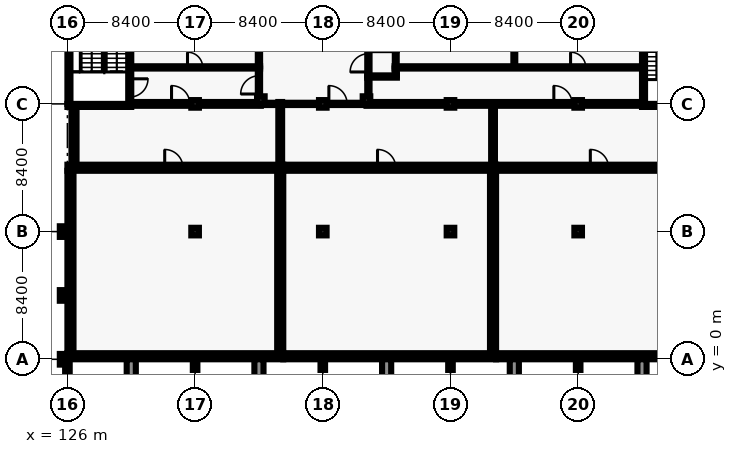
"""IFC4 building model, lengths in metres.
Left out: names, types, materials, properties, quantities, classifications, styles, units other than length and angle.
Written with IfcOpenShell. Run it as: python <this file> out.ifc"""

import sys

from ifc_helpers import new_model, si_unit, direction, frame, frame_2d, origin, origin_2d, place, context, subcontext, project, spatial, rectangle, extrude, element, fill, save


model = new_model("IFC4")
c1 = context("Model", 3, precision=1e-05, world=origin(), true_north=direction((0.0, 1.0)))
c2 = subcontext(c1, "Body", "Model", "MODEL_VIEW")
j1 = project(units=[si_unit("LENGTHUNIT", "METRE"), si_unit("PLANEANGLEUNIT", "RADIAN")], contexts=[c1])
p1 = place(None, origin())
s1 = spatial("IfcSite", under=j1, at=p1, CompositionType="ELEMENT")
p2 = place(p1, origin())
s2 = spatial("IfcBuilding", under=s1, at=p2, CompositionType="ELEMENT")
p3 = place(p2, frame((0.0, 0.0, 10.2)))
s3 = spatial("IfcBuildingStorey", under=s2, at=p3, CompositionType="ELEMENT", Elevation=10.2)
p4 = place(p3, frame((130.2, 16.7, 0.0), z_axis=(0.0, 0.0, 1.0), x_axis=(-1.0, 0.0, 0.0)))
e1 = element("IfcWall", 1, at=p4, inside=s3, PredefinedType="SHEAR", context=c2, shape_type="SweptSolid", body=[
    extrude(rectangle(XDim=4.2, YDim=0.2, at=frame_2d((2.1, 0.0))), origin(), (0.0, 0.0, 1.0), 4.8),
])
p5 = place(p3, frame((126.1, 16.8, 0.0), z_axis=(0.0, 0.0, 1.0), x_axis=(0.0, 1.0, 0.0)))
e2 = element("IfcWall", 2, at=p5, inside=s3, PredefinedType="SHEAR", context=c2, shape_type="SweptSolid", body=[
    extrude(rectangle(XDim=8.2, YDim=0.2, at=frame_2d((4.1, 0.0))), origin(), (0.0, 0.0, 1.0), 4.8),
])
p6 = place(p3, frame((130.1, 25.0, 0.0), z_axis=(0.0, 0.0, 1.0), x_axis=(0.0, -1.0, 0.0)))
e3 = element("IfcWall", 3, at=p6, inside=s3, PredefinedType="SHEAR", context=c2, shape_type="SweptSolid", body=[
    extrude(rectangle(XDim=8.2, YDim=0.2, at=frame_2d((4.1, 0.0))), origin(), (0.0, 0.0, 1.0), 4.8),
])
p7 = place(p6, frame((6.55, 0.0, 0.0)))
e4 = element("IfcOpeningElement", 4, at=p7, cuts=e3, PredefinedType="OPENING", context=c2, shape_type="SweptSolid", body=[
    extrude(rectangle(XDim=1.2, YDim=2.1, at=frame_2d((0.6, 1.05))), frame((0.0, 0.11, 0.0), z_axis=(0.0, -1.0, 0.0), x_axis=(1.0, 0.0, 0.0)), (0.0, 0.0, 1.0), 0.22),
])
p8 = place(p3, frame((168.0, 16.7, 0.0), z_axis=(0.0, 0.0, 1.0), x_axis=(-1.0, 0.0, 0.0)))
e5 = element("IfcWall", 5, at=p8, inside=s3, PredefinedType="SHEAR", context=c2, shape_type="SweptSolid", body=[
    extrude(rectangle(XDim=4.199, YDim=0.2, at=frame_2d((2.1, 0.0))), origin(), (0.0, 0.0, 1.0), 4.8),
])
p9 = place(p3, frame((163.9, 16.8, 0.0), z_axis=(0.0, 0.0, 1.0), x_axis=(0.0, 1.0, 0.0)))
e6 = element("IfcWall", 6, at=p9, inside=s3, PredefinedType="SHEAR", context=c2, shape_type="SweptSolid", body=[
    extrude(rectangle(XDim=8.2, YDim=0.2, at=frame_2d((4.1, 0.0))), origin(), (0.0, 0.0, 1.0), 4.8),
])
p10 = place(p9, frame((6.55, 0.0, 0.0)))
e7 = element("IfcOpeningElement", 7, at=p10, cuts=e6, PredefinedType="OPENING", context=c2, shape_type="SweptSolid", body=[
    extrude(rectangle(XDim=1.2, YDim=2.1, at=frame_2d((0.6, 1.05))), frame((0.0, 0.11, 0.0), z_axis=(0.0, -1.0, 0.0), x_axis=(1.0, 0.0, 0.0)), (0.0, 0.0, 1.0), 0.22),
])
p11 = place(p3, frame((140.2, 0.2, 0.0), z_axis=(0.0, 0.0, 1.0), x_axis=(-1.0, 0.0, 0.0)))
e8 = element("IfcWall", 8, at=p11, inside=s3, PredefinedType="SHEAR", context=c2, shape_type="SweptSolid", body=[
    extrude(rectangle(XDim=14.2, YDim=0.4, at=frame_2d((7.1, 0.0))), origin(), (0.0, 0.0, 1.0), 4.8),
])
p12 = place(p3, frame((126.0, 12.6, 0.0), z_axis=(0.0, 0.0, 1.0), x_axis=(1.0, 0.0, 0.0)))
e9 = element("IfcWall", 9, at=p12, inside=s3, PredefinedType="SHEAR", context=c2, shape_type="SweptSolid", body=[
    extrude(rectangle(XDim=14.2, YDim=0.4, at=frame_2d((7.1, 0.0))), origin(), (0.0, 0.0, 1.0), 4.8),
])
p13 = place(p12, frame((6.4, 0.0, 0.0)))
e10 = element("IfcOpeningElement", 10, at=p13, cuts=e9, PredefinedType="OPENING", context=c2, shape_type="SweptSolid", body=[
    extrude(rectangle(XDim=1.2, YDim=2.1, at=frame_2d((0.6, 1.05))), frame((0.0, 0.21, 0.0), z_axis=(0.0, -1.0, 0.0), x_axis=(1.0, 0.0, 0.0)), (0.0, 0.0, 1.0), 0.42),
])
for number, where, z_axis, x_axis in (
    (11, (126.2, 0.4, 0.0), (0.0, 0.0, 1.0), (0.0, 1.0, 0.0)),
    (12, (140.0, 12.4, 0.0), (0.0, 0.0, 1.0), (0.0, -1.0, 0.0)),
):
    element("IfcWall", number, at=place(p3, frame(where, z_axis=z_axis, x_axis=x_axis)), inside=s3, PredefinedType="SHEAR", context=c2, shape_type="SweptSolid", body=[
        extrude(rectangle(XDim=12.0, YDim=0.4, at=frame_2d((6.0, 0.0))), origin(), (0.0, 0.0, 1.0), 4.8),
    ])
p14 = place(p3, frame((154.2, 0.2, 0.0), z_axis=(0.0, 0.0, 1.0), x_axis=(-1.0, 0.0, 0.0)))
e13 = element("IfcWall", 13, at=p14, inside=s3, PredefinedType="SHEAR", context=c2, shape_type="SweptSolid", body=[
    extrude(rectangle(XDim=14.0, YDim=0.4, at=frame_2d((7.0, 0.0))), origin(), (0.0, 0.0, 1.0), 4.8),
])
p15 = place(p3, frame((140.2, 12.6, 0.0), z_axis=(0.0, 0.0, 1.0), x_axis=(1.0, 0.0, 0.0)))
e14 = element("IfcWall", 14, at=p15, inside=s3, PredefinedType="SHEAR", context=c2, shape_type="SweptSolid", body=[
    extrude(rectangle(XDim=14.0, YDim=0.4, at=frame_2d((7.0, 0.0))), origin(), (0.0, 0.0, 1.0), 4.8),
])
p16 = place(p15, frame((6.2, 0.0, 0.0)))
e15 = element("IfcOpeningElement", 15, at=p16, cuts=e14, PredefinedType="OPENING", context=c2, shape_type="SweptSolid", body=[
    extrude(rectangle(XDim=1.2, YDim=2.1, at=frame_2d((0.6, 1.05))), frame((0.0, 0.21, 0.0), z_axis=(0.0, -1.0, 0.0), x_axis=(1.0, 0.0, 0.0)), (0.0, 0.0, 1.0), 0.42),
])
p17 = place(p3, frame((154.0, 12.4, 0.0), z_axis=(0.0, 0.0, 1.0), x_axis=(0.0, -1.0, 0.0)))
e16 = element("IfcWall", 16, at=p17, inside=s3, PredefinedType="SHEAR", context=c2, shape_type="SweptSolid", body=[
    extrude(rectangle(XDim=12.0, YDim=0.4, at=frame_2d((6.0, 0.0))), origin(), (0.0, 0.0, 1.0), 4.8),
])
p18 = place(p3, frame((168.0, 0.2, 0.0), z_axis=(0.0, 0.0, 1.0), x_axis=(-1.0, 0.0, 0.0)))
e17 = element("IfcWall", 17, at=p18, inside=s3, PredefinedType="SHEAR", context=c2, shape_type="SweptSolid", body=[
    extrude(rectangle(XDim=13.8, YDim=0.4, at=frame_2d((6.9, 0.0))), origin(), (0.0, 0.0, 1.0), 4.8),
])
p19 = place(p3, frame((154.2, 12.6, 0.0), z_axis=(0.0, 0.0, 1.0), x_axis=(1.0, 0.0, 0.0)))
e18 = element("IfcWall", 18, at=p19, inside=s3, PredefinedType="SHEAR", context=c2, shape_type="SweptSolid", body=[
    extrude(rectangle(XDim=13.8, YDim=0.4, at=frame_2d((6.9, 0.0))), origin(), (0.0, 0.0, 1.0), 4.8),
])
p20 = place(p19, frame((6.2, 0.0, 0.0)))
e19 = element("IfcOpeningElement", 19, at=p20, cuts=e18, PredefinedType="OPENING", context=c2, shape_type="SweptSolid", body=[
    extrude(rectangle(XDim=1.2, YDim=2.1, at=frame_2d((0.6, 1.05))), frame((0.0, 0.21, 0.0), z_axis=(0.0, -1.0, 0.0), x_axis=(1.0, 0.0, 0.0)), (0.0, 0.0, 1.0), 0.42),
])
for number, where, z_axis, x_axis in (
    (20, (134.4, 8.4, 0.0), (0.0, 0.0, 1.0), (1.0, 0.0, 0.0)),
    (21, (134.4, 16.8, 0.0), (0.0, 0.0, 1.0), (1.0, 0.0, 0.0)),
    (22, (142.8, 8.4, 0.0), (0.0, 0.0, 1.0), (1.0, 0.0, 0.0)),
    (23, (142.8, 16.8, 0.0), (0.0, 0.0, 1.0), (1.0, 0.0, 0.0)),
    (24, (151.2, 8.4, 0.0), (0.0, 0.0, 1.0), (1.0, 0.0, 0.0)),
    (25, (151.2, 16.8, 0.0), (0.0, 0.0, 1.0), (1.0, 0.0, 0.0)),
    (26, (159.6, 8.4, 0.0), (0.0, 0.0, 1.0), (1.0, 0.0, 0.0)),
    (27, (159.6, 16.8, 0.0), (0.0, 0.0, 1.0), (1.0, 0.0, 0.0)),
    (28, (138.725, 17.05, 0.0), (0.0, 0.0, 1.0), (1.0, 0.0, 0.0)),
    (29, (145.675, 17.05, 0.0), (0.0, 0.0, 1.0), (1.0, 0.0, 0.0)),
):
    element("IfcColumn", number, at=place(p3, frame(where, z_axis=z_axis, x_axis=x_axis)), inside=s3, PredefinedType="COLUMN", context=c2, shape_type="SweptSolid", body=[
        extrude(rectangle(XDim=0.5, YDim=0.5, at=origin_2d()), origin(), (0.0, 0.0, 1.0), 4.8),
    ])
for number, where, z_axis, x_axis in (
    (30, (126.0, -0.5, 0.0), (0.0, 0.0, 1.0), (1.0, 0.0, 0.0)),
    (31, (134.4, -0.35, 0.0), (0.0, 0.0, 1.0), (1.0, 0.0, 0.0)),
    (32, (142.8, -0.35, 0.0), (0.0, 0.0, 1.0), (1.0, 0.0, 0.0)),
    (33, (151.2, -0.35, 0.0), (0.0, 0.0, 1.0), (1.0, 0.0, 0.0)),
    (34, (159.6, -0.35, 0.0), (0.0, 0.0, 1.0), (1.0, 0.0, 0.0)),
):
    element("IfcColumn", number, at=place(p3, frame(where, z_axis=z_axis, x_axis=x_axis)), inside=s3, PredefinedType="PILASTER", context=c2, shape_type="SweptSolid", body=[
        extrude(rectangle(XDim=0.3, YDim=0.7, at=origin_2d()), origin(), (0.0, 0.0, 1.0), 4.8),
    ])
p21 = place(p3, frame((126.45, 12.8, 0.0), z_axis=(0.0, 0.0, 1.0), x_axis=(0.0, 1.0, 0.0)))
e35 = element("IfcWall", 35, at=p21, inside=s3, PredefinedType="SOLIDWALL", context=c2, shape_type="SweptSolid", body=[
    extrude(rectangle(XDim=3.8, YDim=0.3, at=frame_2d((1.9, 0.0))), origin(), (0.0, 0.0, 1.0), 4.5),
])
for number, where, z_axis, x_axis in (
    (36, (125.65, 0.0, 0.0), (0.0, 0.0, 1.0), (0.0, 1.0, 0.0)),
    (37, (125.65, 4.2, 0.0), (0.0, 0.0, 1.0), (0.0, 1.0, 0.0)),
    (38, (125.65, 8.4, 0.0), (0.0, 0.0, 1.0), (0.0, 1.0, 0.0)),
):
    element("IfcColumn", number, at=place(p3, frame(where, z_axis=z_axis, x_axis=x_axis)), inside=s3, PredefinedType="PILASTER", context=c2, shape_type="SweptSolid", body=[
        extrude(rectangle(XDim=0.3, YDim=0.7, at=origin_2d()), origin(), (0.0, 0.0, 1.0), 4.8),
    ])
for number, where, z_axis, x_axis in (
    (39, (130.2, 0.0, 0.0), (0.0, 0.0, 1.0), (0.0, -1.0, 0.0)),
    (40, (138.6, 0.0, 0.0), (0.0, 0.0, 1.0), (0.0, -1.0, 0.0)),
    (41, (147.0, 0.0, 0.0), (0.0, 0.0, 1.0), (0.0, -1.0, 0.0)),
    (42, (155.4, 0.0, 0.0), (0.0, 0.0, 1.0), (0.0, -1.0, 0.0)),
    (43, (163.8, 0.0, 0.0), (0.0, 0.0, 1.0), (0.0, -1.0, 0.0)),
):
    element("IfcWall", number, at=place(p3, frame(where, z_axis=z_axis, x_axis=x_axis)), inside=s3, PredefinedType="SOLIDWALL", context=c2, shape_type="SweptSolid", body=[
        extrude(rectangle(XDim=1.5, YDim=0.6, at=frame_2d((0.75, 0.0))), origin(), (0.0, 0.0, 1.0), 4.8),
    ])
p22 = place(p3, frame((130.2, 16.8, 0.0), z_axis=(0.0, 0.0, 1.0), x_axis=(1.0, 0.0, 0.0)))
e44 = element("IfcWall", 44, at=p22, inside=s3, PredefinedType="PARTITIONING", context=c2, shape_type="SweptSolid", body=[
    extrude(rectangle(XDim=8.525, YDim=0.25, at=frame_2d((4.263, 0.0))), origin(), (0.0, 0.0, 1.0), 3.8),
])
p23 = place(p22, frame((2.65, 0.0, 0.0)))
e45 = element("IfcOpeningElement", 45, at=p23, cuts=e44, PredefinedType="OPENING", context=c2, shape_type="SweptSolid", body=[
    extrude(rectangle(XDim=1.2, YDim=2.1, at=frame_2d((0.6, 1.05))), frame((0.0, 0.135, 0.0), z_axis=(0.0, -1.0, 0.0), x_axis=(1.0, 0.0, 0.0)), (0.0, 0.0, 1.0), 0.27),
])
p24 = place(p3, frame((145.675, 16.8, 0.0), z_axis=(0.0, 0.0, 1.0), x_axis=(1.0, 0.0, 0.0)))
e46 = element("IfcWall", 46, at=p24, inside=s3, PredefinedType="PARTITIONING", context=c2, shape_type="SweptSolid", body=[
    extrude(rectangle(XDim=18.125, YDim=0.25, at=frame_2d((9.062, 0.0))), origin(), (0.0, 0.0, 1.0), 3.8),
])
p25 = place(p24, frame((12.325, 0.0, 0.0)))
e47 = element("IfcOpeningElement", 47, at=p25, cuts=e46, PredefinedType="OPENING", context=c2, shape_type="SweptSolid", body=[
    extrude(rectangle(XDim=1.2, YDim=2.1, at=frame_2d((0.6, 1.05))), frame((0.0, 0.135, 0.0), z_axis=(0.0, -1.0, 0.0), x_axis=(1.0, 0.0, 0.0)), (0.0, 0.0, 1.0), 0.27),
])
p26 = place(p3, frame((140.0, 12.8, 0.0), z_axis=(0.0, 0.0, 1.0), x_axis=(0.0, 1.0, 0.0)))
e48 = element("IfcWall", 48, at=p26, inside=s3, PredefinedType="PARTITIONING", context=c2, shape_type="SweptSolid", body=[
    extrude(rectangle(XDim=4.125, YDim=0.25, at=frame_2d((2.062, 0.0))), origin(), (0.0, 0.0, 1.0), 3.8),
])
p27 = place(p3, frame((154.0, 12.8, 0.0), z_axis=(0.0, 0.0, 1.0), x_axis=(0.0, 1.0, 0.0)))
e49 = element("IfcWall", 49, at=p27, inside=s3, PredefinedType="PARTITIONING", context=c2, shape_type="SweptSolid", body=[
    extrude(rectangle(XDim=3.875, YDim=0.25, at=frame_2d((1.938, 0.0))), origin(), (0.0, 0.0, 1.0), 3.8),
])
p28 = place(p3, frame((145.725, 18.6, 0.0), z_axis=(0.0, 0.0, 1.0), x_axis=(1.0, 0.0, 0.0)))
e50 = element("IfcWall", 50, at=p28, inside=s3, PredefinedType="PARTITIONING", context=c2, shape_type="SweptSolid", body=[
    extrude(rectangle(XDim=1.95, YDim=0.15, at=frame_2d((0.975, 0.0))), origin(), (0.0, 0.0, 1.0), 4.5),
])
p29 = place(p3, frame((130.2, 19.2, 0.0), z_axis=(0.0, 0.0, 1.0), x_axis=(1.0, 0.0, 0.0)))
e51 = element("IfcWall", 51, at=p29, inside=s3, PredefinedType="PARTITIONING", context=c2, shape_type="SweptSolid", body=[
    extrude(rectangle(XDim=8.475, YDim=0.15, at=frame_2d((4.237, 0.0))), origin(), (0.0, 0.0, 1.0), 3.8),
])
p30 = place(p29, frame((3.7, 0.0, 0.0)))
e52 = element("IfcOpeningElement", 52, at=p30, cuts=e51, PredefinedType="OPENING", context=c2, shape_type="SweptSolid", body=[
    extrude(rectangle(XDim=1.0, YDim=2.1, at=frame_2d((0.5, 1.05))), frame((0.0, 0.085, 0.0), z_axis=(0.0, -1.0, 0.0), x_axis=(1.0, 0.0, 0.0)), (0.0, 0.0, 1.0), 0.17),
])
p31 = place(p3, frame((147.525, 19.2, 0.0), z_axis=(0.0, 0.0, 1.0), x_axis=(1.0, 0.0, 0.0)))
e53 = element("IfcWall", 53, at=p31, inside=s3, PredefinedType="PARTITIONING", context=c2, shape_type="SweptSolid", body=[
    extrude(rectangle(XDim=16.275, YDim=0.15, at=frame_2d((8.137, 0.0))), origin(), (0.0, 0.0, 1.0), 3.8),
])
p32 = place(p31, frame((11.575, 0.0, 0.0)))
e54 = element("IfcOpeningElement", 54, at=p32, cuts=e53, PredefinedType="OPENING", context=c2, shape_type="SweptSolid", body=[
    extrude(rectangle(XDim=1.0, YDim=2.1, at=frame_2d((0.5, 1.05))), frame((0.0, 0.085, 0.0), z_axis=(0.0, -1.0, 0.0), x_axis=(1.0, 0.0, 0.0)), (0.0, 0.0, 1.0), 0.17),
])
p33 = place(p3, frame((138.725, 16.8, 0.0), z_axis=(0.0, 0.0, 1.0), x_axis=(1.0, 0.0, 0.0)))
e55 = element("IfcWall", 55, at=p33, inside=s3, PredefinedType="SOLIDWALL", context=c2, shape_type="SweptSolid", body=[
    extrude(rectangle(XDim=1.15, YDim=0.15, at=frame_2d((0.575, 0.0))), origin(), (0.0, 0.0, 1.0), 3.8),
])
p34 = place(p3, frame((140.125, 16.8, 0.0), z_axis=(0.0, 0.0, 1.0), x_axis=(1.0, 0.0, 0.0)))
e56 = element("IfcWall", 56, at=p34, inside=s3, PredefinedType="SOLIDWALL", context=c2, shape_type="SweptSolid", body=[
    extrude(rectangle(XDim=5.55, YDim=0.15, at=frame_2d((2.775, 0.0))), origin(), (0.0, 0.0, 1.0), 3.8),
])
p35 = place(p34, frame((3.075, 0.0, 0.0)))
e57 = element("IfcOpeningElement", 57, at=p35, cuts=e56, PredefinedType="OPENING", context=c2, shape_type="SweptSolid", body=[
    extrude(rectangle(XDim=1.2, YDim=2.1, at=frame_2d((0.6, 1.05))), frame((0.0, 0.085, 0.0), z_axis=(0.0, -1.0, 0.0), x_axis=(1.0, 0.0, 0.0)), (0.0, 0.0, 1.0), 0.17),
])
p36 = place(p3, frame((147.6, 18.675, 0.0), z_axis=(0.0, 0.0, 1.0), x_axis=(0.0, 1.0, 0.0)))
e58 = element("IfcWall", 58, at=p36, inside=s3, PredefinedType="PARTITIONING", context=c2, shape_type="SweptSolid", body=[
    extrude(rectangle(XDim=0.45, YDim=0.15, at=frame_2d((0.225, 0.0))), origin(), (0.0, 0.0, 1.0), 4.5),
])
p37 = place(p3, frame((138.6, 16.925, 0.0), z_axis=(0.0, 0.0, 1.0), x_axis=(0.0, 1.0, 0.0)))
e59 = element("IfcWall", 59, at=p37, inside=s3, PredefinedType="SOLIDWALL", context=c2, shape_type="SweptSolid", body=[
    extrude(rectangle(XDim=2.2, YDim=0.15, at=frame_2d((1.1, 0.0))), origin(), (0.0, 0.0, 1.0), 3.8),
])
p38 = place(p37, frame((0.525, 0.0, 0.0)))
e60 = element("IfcOpeningElement", 60, at=p38, cuts=e59, PredefinedType="OPENING", context=c2, shape_type="SweptSolid", body=[
    extrude(rectangle(XDim=1.2, YDim=2.1, at=frame_2d((0.6, 1.05))), frame((0.0, 0.085, 0.0), z_axis=(0.0, -1.0, 0.0), x_axis=(1.0, 0.0, 0.0)), (0.0, 0.0, 1.0), 0.17),
])
p39 = place(p3, frame((138.6, 19.275, 0.0), z_axis=(0.0, 0.0, 1.0), x_axis=(0.0, 1.0, 0.0)))
e61 = element("IfcWall", 61, at=p39, inside=s3, PredefinedType="SOLIDWALL", context=c2, shape_type="SweptSolid", body=[
    extrude(rectangle(XDim=3.0, YDim=0.15, at=frame_2d((1.5, 0.0))), origin(), (0.0, 0.0, 1.0), 4.5),
])
p40 = place(p3, frame((145.8, 16.925, 0.0), z_axis=(0.0, 0.0, 1.0), x_axis=(0.0, 1.0, 0.0)))
e62 = element("IfcWall", 62, at=p40, inside=s3, PredefinedType="SOLIDWALL", context=c2, shape_type="SweptSolid", body=[
    extrude(rectangle(XDim=1.6, YDim=0.15, at=frame_2d((0.8, 0.0))), origin(), (0.0, 0.0, 1.0), 3.8),
])
p41 = place(p3, frame((145.8, 18.675, 0.0), z_axis=(0.0, 0.0, 1.0), x_axis=(0.0, 1.0, 0.0)))
e63 = element("IfcWall", 63, at=p41, inside=s3, PredefinedType="SOLIDWALL", context=c2, shape_type="SweptSolid", body=[
    extrude(rectangle(XDim=3.6, YDim=0.15, at=frame_2d((1.8, 0.0))), origin(), (0.0, 0.0, 1.0), 4.5),
])
p42 = place(p41, frame((0.225, 0.0, 0.0)))
e64 = element("IfcOpeningElement", 64, at=p42, cuts=e63, PredefinedType="OPENING", context=c2, shape_type="SweptSolid", body=[
    extrude(rectangle(XDim=1.2, YDim=2.1, at=frame_2d((0.6, 1.05))), frame((0.0, 0.085, 0.0), z_axis=(0.0, -1.0, 0.0), x_axis=(1.0, 0.0, 0.0)), (0.0, 0.0, 1.0), 0.17),
])
p43 = place(p3, frame((147.6, 19.275, 0.0), z_axis=(0.0, 0.0, 1.0), x_axis=(0.0, 1.0, 0.0)))
e65 = element("IfcWall", 65, at=p43, inside=s3, PredefinedType="PARTITIONING", context=c2, shape_type="SweptSolid", body=[
    extrude(rectangle(XDim=1.062, YDim=0.125, at=frame_2d((0.531, 0.0))), origin(), (0.0, 0.0, 1.0), 4.5),
])
p44 = place(p3, frame((155.4, 19.275, 0.0), z_axis=(0.0, 0.0, 1.0), x_axis=(0.0, 1.0, 0.0)))
e66 = element("IfcWall", 66, at=p44, inside=s3, PredefinedType="PARTITIONING", context=c2, shape_type="SweptSolid", body=[
    extrude(rectangle(XDim=5.425, YDim=0.125, at=frame_2d((2.712, 0.0))), origin(), (0.0, 0.0, 1.0), 3.8),
])
p45 = place(p44, frame((2.425, 0.0, 0.0)))
e67 = element("IfcOpeningElement", 67, at=p45, cuts=e66, PredefinedType="OPENING", context=c2, shape_type="SweptSolid", body=[
    extrude(rectangle(XDim=1.0, YDim=2.1, at=frame_2d((0.5, 1.05))), frame((0.0, 0.073, 0.0), z_axis=(0.0, -1.0, 0.0), x_axis=(1.0, 0.0, 0.0)), (0.0, 0.0, 1.0), 0.145),
])
p46 = place(p7, origin())
e68 = element("IfcDoor", 68, at=p46, inside=s3, OperationType="SINGLE_SWING_LEFT", PredefinedType="DOOR", context=c2, shape_type="SweptSolid", body=[
    extrude(rectangle(XDim=1.2, YDim=2.1, at=frame_2d((0.6, 1.05))), frame((0.0, 0.025, 0.0), z_axis=(0.0, -1.0, 0.0), x_axis=(1.0, 0.0, 0.0)), (0.0, 0.0, 1.0), 0.05),
])
fill(e4, e68)
p47 = place(p23, origin())
e69 = element("IfcDoor", 69, at=p47, inside=s3, OperationType="SINGLE_SWING_LEFT", PredefinedType="DOOR", context=c2, shape_type="SweptSolid", body=[
    extrude(rectangle(XDim=1.2, YDim=2.1, at=frame_2d((0.6, 1.05))), frame((0.0, 0.025, 0.0), z_axis=(0.0, -1.0, 0.0), x_axis=(1.0, 0.0, 0.0)), (0.0, 0.0, 1.0), 0.05),
])
fill(e45, e69)
p48 = place(p38, origin())
e70 = element("IfcDoor", 70, at=p48, inside=s3, OperationType="SINGLE_SWING_RIGHT", PredefinedType="DOOR", context=c2, shape_type="SweptSolid", body=[
    extrude(rectangle(XDim=1.2, YDim=2.1, at=frame_2d((0.6, 1.05))), frame((0.0, 0.025, 0.0), z_axis=(0.0, -1.0, 0.0), x_axis=(1.0, 0.0, 0.0)), (0.0, 0.0, 1.0), 0.05),
])
fill(e60, e70)
p49 = place(p30, origin())
e71 = element("IfcDoor", 71, at=p49, inside=s3, OperationType="SINGLE_SWING_LEFT", PredefinedType="DOOR", context=c2, shape_type="SweptSolid", body=[
    extrude(rectangle(XDim=1.0, YDim=2.1, at=frame_2d((0.5, 1.05))), frame((0.0, 0.025, 0.0), z_axis=(0.0, -1.0, 0.0), x_axis=(1.0, 0.0, 0.0)), (0.0, 0.0, 1.0), 0.05),
])
fill(e52, e71)
p50 = place(p32, origin())
e72 = element("IfcDoor", 72, at=p50, inside=s3, OperationType="SINGLE_SWING_RIGHT", PredefinedType="DOOR", context=c2, shape_type="SweptSolid", body=[
    extrude(rectangle(XDim=1.0, YDim=2.1, at=frame_2d((0.5, 1.05))), frame((0.0, 0.025, 0.0), z_axis=(0.0, -1.0, 0.0), x_axis=(1.0, 0.0, 0.0)), (0.0, 0.0, 1.0), 0.05),
])
fill(e54, e72)
p51 = place(p35, origin())
e73 = element("IfcDoor", 73, at=p51, inside=s3, OperationType="SINGLE_SWING_RIGHT", PredefinedType="DOOR", context=c2, shape_type="SweptSolid", body=[
    extrude(rectangle(XDim=1.2, YDim=2.1, at=frame_2d((0.6, 1.05))), frame((0.0, 0.025, 0.0), z_axis=(0.0, -1.0, 0.0), x_axis=(1.0, 0.0, 0.0)), (0.0, 0.0, 1.0), 0.05),
])
fill(e57, e73)
p52 = place(p42, origin())
e74 = element("IfcDoor", 74, at=p52, inside=s3, OperationType="SINGLE_SWING_RIGHT", PredefinedType="DOOR", context=c2, shape_type="SweptSolid", body=[
    extrude(rectangle(XDim=1.2, YDim=2.1, at=frame_2d((0.6, 1.05))), frame((0.0, 0.025, 0.0), z_axis=(0.0, -1.0, 0.0), x_axis=(1.0, 0.0, 0.0)), (0.0, 0.0, 1.0), 0.05),
])
fill(e64, e74)
p53 = place(p25, origin())
e75 = element("IfcDoor", 75, at=p53, inside=s3, OperationType="SINGLE_SWING_LEFT", PredefinedType="DOOR", context=c2, shape_type="SweptSolid", body=[
    extrude(rectangle(XDim=1.2, YDim=2.1, at=frame_2d((0.6, 1.05))), frame((0.0, 0.025, 0.0), z_axis=(0.0, -1.0, 0.0), x_axis=(1.0, 0.0, 0.0)), (0.0, 0.0, 1.0), 0.05),
])
fill(e47, e75)
p54 = place(p13, origin())
e76 = element("IfcDoor", 76, at=p54, inside=s3, OperationType="SINGLE_SWING_RIGHT", PredefinedType="DOOR", context=c2, shape_type="SweptSolid", body=[
    extrude(rectangle(XDim=1.2, YDim=2.1, at=frame_2d((0.6, 1.05))), frame((0.0, 0.025, 0.0), z_axis=(0.0, -1.0, 0.0), x_axis=(1.0, 0.0, 0.0)), (0.0, 0.0, 1.0), 0.05),
])
fill(e10, e76)
p55 = place(p16, origin())
e77 = element("IfcDoor", 77, at=p55, inside=s3, OperationType="SINGLE_SWING_RIGHT", PredefinedType="DOOR", context=c2, shape_type="SweptSolid", body=[
    extrude(rectangle(XDim=1.2, YDim=2.1, at=frame_2d((0.6, 1.05))), frame((0.0, 0.025, 0.0), z_axis=(0.0, -1.0, 0.0), x_axis=(1.0, 0.0, 0.0)), (0.0, 0.0, 1.0), 0.05),
])
fill(e15, e77)
p56 = place(p20, origin())
e78 = element("IfcDoor", 78, at=p56, inside=s3, OperationType="SINGLE_SWING_RIGHT", PredefinedType="DOOR", context=c2, shape_type="SweptSolid", body=[
    extrude(rectangle(XDim=1.2, YDim=2.1, at=frame_2d((0.6, 1.05))), frame((0.0, 0.025, 0.0), z_axis=(0.0, -1.0, 0.0), x_axis=(1.0, 0.0, 0.0)), (0.0, 0.0, 1.0), 0.05),
])
fill(e19, e78)
save(model, sys.argv[1])
